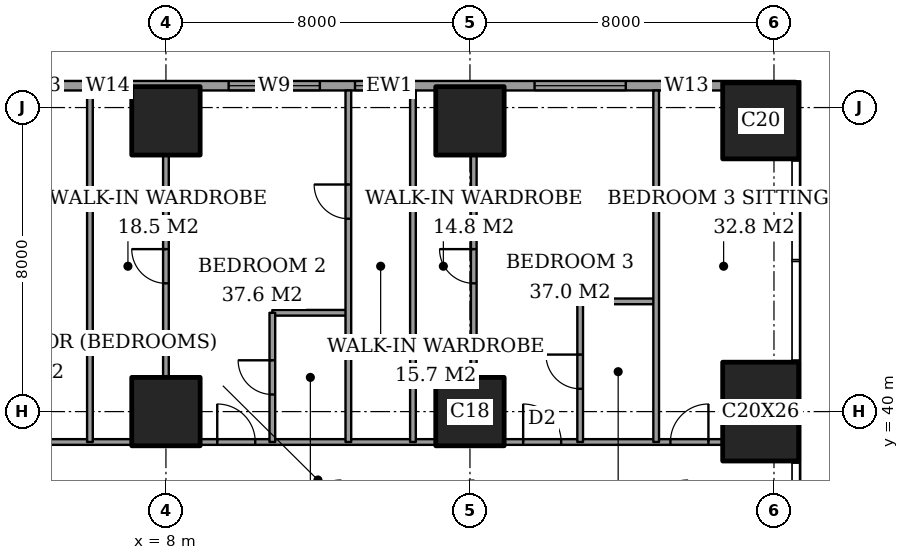
"""IFC4 building model, lengths in metres.
Left out: names, types, materials, properties, quantities, classifications, styles, units other than length and angle.
Written with IfcOpenShell. Run it as: python <this file> out.ifc"""

import sys

from ifc_helpers import new_model, si_unit, direction, frame, frame_2d, origin, origin_2d, place, context, subcontext, project, spatial, rectangle, extrude, element, fill, save


model = new_model("IFC4")
c1 = context("Model", 3, precision=1e-05, world=origin(), true_north=direction((0.0, 1.0)))
c2 = subcontext(c1, "Body", "Model", "MODEL_VIEW")
j1 = project(units=[si_unit("LENGTHUNIT", "METRE"), si_unit("PLANEANGLEUNIT", "RADIAN")], contexts=[c1])
p1 = place(None, origin())
s1 = spatial("IfcSite", under=j1, at=p1, CompositionType="ELEMENT")
p2 = place(p1, origin())
s2 = spatial("IfcBuilding", under=s1, at=p2, CompositionType="ELEMENT")
p3 = place(p2, frame((0.0, 0.0, 203.8)))
s3 = spatial("IfcBuildingStorey", under=s2, at=p3, CompositionType="ELEMENT", Elevation=203.8)
for number, where, z_axis, x_axis in (
    (1, (8.0, 40.0, 0.0), (0.0, 0.0, 1.0), (1.0, 0.0, 0.0)),
    (2, (8.0, 47.65, 0.0), (0.0, 0.0, 1.0), (1.0, 0.0, 0.0)),
    (3, (16.0, 40.0, 0.0), (0.0, 0.0, 1.0), (1.0, 0.0, 0.0)),
    (4, (16.0, 47.65, 0.0), (0.0, 0.0, 1.0), (1.0, 0.0, 0.0)),
):
    element("IfcColumn", number, at=place(p3, frame(where, z_axis=z_axis, x_axis=x_axis)), inside=s3, PredefinedType="COLUMN", context=c2, shape_type="SweptSolid", body=[
        extrude(rectangle(XDim=1.8, YDim=1.8, at=origin_2d()), origin(), (0.0, 0.0, 1.0), 3.6),
    ])
p4 = place(p3, frame((23.65, 40.0, 0.0), z_axis=(0.0, 0.0, 1.0), x_axis=(1.0, 0.0, 0.0)))
e5 = element("IfcColumn", 5, at=p4, inside=s3, PredefinedType="COLUMN", context=c2, shape_type="SweptSolid", body=[
    extrude(rectangle(XDim=2.0, YDim=2.6, at=origin_2d()), origin(), (0.0, 0.0, 1.0), 3.6),
])
p5 = place(p3, frame((23.65, 47.65, 0.0), z_axis=(0.0, 0.0, 1.0), x_axis=(1.0, 0.0, 0.0)))
e6 = element("IfcColumn", 6, at=p5, inside=s3, PredefinedType="COLUMN", context=c2, shape_type="SweptSolid", body=[
    extrude(rectangle(XDim=2.0, YDim=2.0, at=origin_2d()), origin(), (0.0, 0.0, 1.0), 3.6),
])
p6 = place(p3, frame((24.575, 48.575, 0.0), z_axis=(0.0, 0.0, 1.0), x_axis=(-1.0, 0.0, 0.0)))
e7 = element("IfcWall", 7, at=p6, inside=s3, PredefinedType="SOLIDWALL", context=c2, shape_type="SweptSolid", body=[
    extrude(rectangle(XDim=21.4, YDim=0.25, at=frame_2d((10.7, 0.0))), origin(), (0.0, 0.0, 1.0), 3.6),
])
p7 = place(p6, frame((2.275, 0.0, 0.2)))
e8 = element("IfcOpeningElement", 8, at=p7, cuts=e7, PredefinedType="OPENING", context=c2, shape_type="SweptSolid", body=[
    extrude(rectangle(XDim=1.2, YDim=2.4, at=frame_2d((0.6, 1.2))), frame((0.0, 0.135, 0.0), z_axis=(0.0, -1.0, 0.0), x_axis=(1.0, 0.0, 0.0)), (0.0, 0.0, 1.0), 0.27),
])
p8 = place(p6, frame((4.475, 0.0, 0.2)))
e9 = element("IfcOpeningElement", 9, at=p8, cuts=e7, PredefinedType="OPENING", context=c2, shape_type="SweptSolid", body=[
    extrude(rectangle(XDim=2.4, YDim=2.4, at=frame_2d((1.2, 1.2))), frame((0.0, 0.135, 0.0), z_axis=(0.0, -1.0, 0.0), x_axis=(1.0, 0.0, 0.0)), (0.0, 0.0, 1.0), 0.27),
])
p9 = place(p6, frame((10.4, 0.0, 0.2)))
e10 = element("IfcOpeningElement", 10, at=p9, cuts=e7, PredefinedType="OPENING", context=c2, shape_type="SweptSolid", body=[
    extrude(rectangle(XDim=1.2, YDim=2.4, at=frame_2d((0.6, 1.2))), frame((0.0, 0.135, 0.0), z_axis=(0.0, -1.0, 0.0), x_axis=(1.0, 0.0, 0.0)), (0.0, 0.0, 1.0), 0.27),
])
p10 = place(p6, frame((12.525, 0.0, 0.2)))
e11 = element("IfcOpeningElement", 11, at=p10, cuts=e7, PredefinedType="OPENING", context=c2, shape_type="SweptSolid", body=[
    extrude(rectangle(XDim=2.4, YDim=2.4, at=frame_2d((1.2, 1.2))), frame((0.0, 0.135, 0.0), z_axis=(0.0, -1.0, 0.0), x_axis=(1.0, 0.0, 0.0)), (0.0, 0.0, 1.0), 0.27),
])
p11 = place(p6, frame((17.8, 0.0, 0.2)))
e12 = element("IfcOpeningElement", 12, at=p11, cuts=e7, PredefinedType="OPENING", context=c2, shape_type="SweptSolid", body=[
    extrude(rectangle(XDim=0.6, YDim=2.4, at=frame_2d((0.3, 1.2))), frame((0.0, 0.135, 0.0), z_axis=(0.0, -1.0, 0.0), x_axis=(1.0, 0.0, 0.0)), (0.0, 0.0, 1.0), 0.27),
])
p12 = place(p6, frame((19.325, 0.0, 0.2)))
e13 = element("IfcOpeningElement", 13, at=p12, cuts=e7, PredefinedType="OPENING", context=c2, shape_type="SweptSolid", body=[
    extrude(rectangle(XDim=1.2, YDim=2.4, at=frame_2d((0.6, 1.2))), frame((0.0, 0.135, 0.0), z_axis=(0.0, -1.0, 0.0), x_axis=(1.0, 0.0, 0.0)), (0.0, 0.0, 1.0), 0.27),
])
p13 = place(p3, frame((1.25, 39.2, 0.0), z_axis=(0.0, 0.0, 1.0), x_axis=(1.0, 0.0, 0.0)))
e14 = element("IfcWall", 14, at=p13, inside=s3, PredefinedType="PARTITIONING", context=c2, shape_type="SweptSolid", body=[
    extrude(rectangle(XDim=5.85, YDim=0.15, at=frame_2d((2.925, 0.0))), origin(), (0.0, 0.0, 1.0), 3.35),
])
p14 = place(p13, frame((1.875, 0.0, 0.0)))
e15 = element("IfcOpeningElement", 15, at=p14, cuts=e14, PredefinedType="OPENING", context=c2, shape_type="SweptSolid", body=[
    extrude(rectangle(XDim=1.0, YDim=2.1, at=frame_2d((0.5, 1.05))), frame((0.0, 0.085, 0.0), z_axis=(0.0, -1.0, 0.0), x_axis=(1.0, 0.0, 0.0)), (0.0, 0.0, 1.0), 0.17),
])
p15 = place(p3, frame((8.9, 39.2, 0.0), z_axis=(0.0, 0.0, 1.0), x_axis=(1.0, 0.0, 0.0)))
e16 = element("IfcWall", 16, at=p15, inside=s3, PredefinedType="PARTITIONING", context=c2, shape_type="SweptSolid", body=[
    extrude(rectangle(XDim=6.2, YDim=0.15, at=frame_2d((3.1, 0.0))), origin(), (0.0, 0.0, 1.0), 3.35),
])
p16 = place(p15, frame((0.45, 0.0, 0.0)))
e17 = element("IfcOpeningElement", 17, at=p16, cuts=e16, PredefinedType="OPENING", context=c2, shape_type="SweptSolid", body=[
    extrude(rectangle(XDim=1.0, YDim=2.1, at=frame_2d((0.5, 1.05))), frame((0.0, 0.085, 0.0), z_axis=(0.0, -1.0, 0.0), x_axis=(1.0, 0.0, 0.0)), (0.0, 0.0, 1.0), 0.17),
])
p17 = place(p3, frame((16.9, 39.2, 0.0), z_axis=(0.0, 0.0, 1.0), x_axis=(1.0, 0.0, 0.0)))
e18 = element("IfcWall", 18, at=p17, inside=s3, PredefinedType="PARTITIONING", context=c2, shape_type="SweptSolid", body=[
    extrude(rectangle(XDim=5.75, YDim=0.15, at=frame_2d((2.875, 0.0))), origin(), (0.0, 0.0, 1.0), 3.35),
])
p18 = place(p17, frame((0.5, 0.0, 0.0)))
e19 = element("IfcOpeningElement", 19, at=p18, cuts=e18, PredefinedType="OPENING", context=c2, shape_type="SweptSolid", body=[
    extrude(rectangle(XDim=1.0, YDim=2.1, at=frame_2d((0.5, 1.05))), frame((0.0, 0.085, 0.0), z_axis=(0.0, -1.0, 0.0), x_axis=(1.0, 0.0, 0.0)), (0.0, 0.0, 1.0), 0.17),
])
p19 = place(p17, frame((4.375, 0.0, 0.0)))
e20 = element("IfcOpeningElement", 20, at=p19, cuts=e18, PredefinedType="OPENING", context=c2, shape_type="SweptSolid", body=[
    extrude(rectangle(XDim=1.0, YDim=2.1, at=frame_2d((0.5, 1.05))), frame((0.0, 0.085, 0.0), z_axis=(0.0, -1.0, 0.0), x_axis=(1.0, 0.0, 0.0)), (0.0, 0.0, 1.0), 0.17),
])
for number, where, z_axis, x_axis in (
    (21, (10.8, 42.6, 0.0), (0.0, 0.0, 1.0), (1.0, 0.0, 0.0)),
    (22, (18.9, 42.9, 0.0), (0.0, 0.0, 1.0), (1.0, 0.0, 0.0)),
):
    element("IfcWall", number, at=place(p3, frame(where, z_axis=z_axis, x_axis=x_axis)), inside=s3, PredefinedType="PARTITIONING", context=c2, shape_type="SweptSolid", body=[
        extrude(rectangle(XDim=2.0, YDim=0.15, at=frame_2d((1.0, 0.0))), origin(), (0.0, 0.0, 1.0), 3.35),
    ])
p20 = place(p3, frame((6.0, 39.2, 0.0), z_axis=(0.0, 0.0, 1.0), x_axis=(0.0, 1.0, 0.0)))
e23 = element("IfcWall", 23, at=p20, inside=s3, PredefinedType="PARTITIONING", context=c2, shape_type="SweptSolid", body=[
    extrude(rectangle(XDim=9.25, YDim=0.15, at=frame_2d((4.625, 0.0))), origin(), (0.0, 0.0, 1.0), 3.35),
])
p21 = place(p3, frame((8.0, 40.9, 0.0), z_axis=(0.0, 0.0, 1.0), x_axis=(0.0, 1.0, 0.0)))
e24 = element("IfcWall", 24, at=p21, inside=s3, PredefinedType="PARTITIONING", context=c2, shape_type="SweptSolid", body=[
    extrude(rectangle(XDim=5.85, YDim=0.15, at=frame_2d((2.925, 0.0))), origin(), (0.0, 0.0, 1.0), 3.35),
])
p22 = place(p21, frame((2.475, 0.0, 0.0)))
e25 = element("IfcOpeningElement", 25, at=p22, cuts=e24, PredefinedType="OPENING", context=c2, shape_type="SweptSolid", body=[
    extrude(rectangle(XDim=0.9, YDim=2.1, at=frame_2d((0.45, 1.05))), frame((0.0, 0.085, 0.0), z_axis=(0.0, -1.0, 0.0), x_axis=(1.0, 0.0, 0.0)), (0.0, 0.0, 1.0), 0.17),
])
p23 = place(p3, frame((10.8, 39.2, 0.0), z_axis=(0.0, 0.0, 1.0), x_axis=(0.0, 1.0, 0.0)))
e26 = element("IfcWall", 26, at=p23, inside=s3, PredefinedType="PARTITIONING", context=c2, shape_type="SweptSolid", body=[
    extrude(rectangle(XDim=3.4, YDim=0.15, at=frame_2d((1.7, 0.0))), origin(), (0.0, 0.0, 1.0), 3.35),
])
p24 = place(p23, frame((1.25, 0.0, 0.0)))
e27 = element("IfcOpeningElement", 27, at=p24, cuts=e26, PredefinedType="OPENING", context=c2, shape_type="SweptSolid", body=[
    extrude(rectangle(XDim=0.9, YDim=2.1, at=frame_2d((0.45, 1.05))), frame((0.0, 0.085, 0.0), z_axis=(0.0, -1.0, 0.0), x_axis=(1.0, 0.0, 0.0)), (0.0, 0.0, 1.0), 0.17),
])
p25 = place(p3, frame((12.8, 39.2, 0.0), z_axis=(0.0, 0.0, 1.0), x_axis=(0.0, 1.0, 0.0)))
e28 = element("IfcWall", 28, at=p25, inside=s3, PredefinedType="PARTITIONING", context=c2, shape_type="SweptSolid", body=[
    extrude(rectangle(XDim=9.25, YDim=0.15, at=frame_2d((4.625, 0.0))), origin(), (0.0, 0.0, 1.0), 3.35),
])
p26 = place(p25, frame((5.875, 0.0, 0.0)))
e29 = element("IfcOpeningElement", 29, at=p26, cuts=e28, PredefinedType="OPENING", context=c2, shape_type="SweptSolid", body=[
    extrude(rectangle(XDim=0.9, YDim=2.1, at=frame_2d((0.45, 1.05))), frame((0.0, 0.085, 0.0), z_axis=(0.0, -1.0, 0.0), x_axis=(1.0, 0.0, 0.0)), (0.0, 0.0, 1.0), 0.17),
])
p27 = place(p3, frame((14.5, 39.2, 0.0), z_axis=(0.0, 0.0, 1.0), x_axis=(0.0, 1.0, 0.0)))
e30 = element("IfcWall", 30, at=p27, inside=s3, PredefinedType="PARTITIONING", context=c2, shape_type="SweptSolid", body=[
    extrude(rectangle(XDim=9.25, YDim=0.15, at=frame_2d((4.625, 0.0))), origin(), (0.0, 0.0, 1.0), 3.35),
])
p28 = place(p3, frame((16.1, 40.9, 0.0), z_axis=(0.0, 0.0, 1.0), x_axis=(0.0, 1.0, 0.0)))
e31 = element("IfcWall", 31, at=p28, inside=s3, PredefinedType="PARTITIONING", context=c2, shape_type="SweptSolid", body=[
    extrude(rectangle(XDim=5.85, YDim=0.15, at=frame_2d((2.925, 0.0))), origin(), (0.0, 0.0, 1.0), 3.35),
])
p29 = place(p28, frame((2.475, 0.0, 0.0)))
e32 = element("IfcOpeningElement", 32, at=p29, cuts=e31, PredefinedType="OPENING", context=c2, shape_type="SweptSolid", body=[
    extrude(rectangle(XDim=0.9, YDim=2.1, at=frame_2d((0.45, 1.05))), frame((0.0, 0.085, 0.0), z_axis=(0.0, -1.0, 0.0), x_axis=(1.0, 0.0, 0.0)), (0.0, 0.0, 1.0), 0.17),
])
p30 = place(p3, frame((18.9, 39.2, 0.0), z_axis=(0.0, 0.0, 1.0), x_axis=(0.0, 1.0, 0.0)))
e33 = element("IfcWall", 33, at=p30, inside=s3, PredefinedType="PARTITIONING", context=c2, shape_type="SweptSolid", body=[
    extrude(rectangle(XDim=3.7, YDim=0.15, at=frame_2d((1.85, 0.0))), origin(), (0.0, 0.0, 1.0), 3.35),
])
p31 = place(p30, frame((1.4, 0.0, 0.0)))
e34 = element("IfcOpeningElement", 34, at=p31, cuts=e33, PredefinedType="OPENING", context=c2, shape_type="SweptSolid", body=[
    extrude(rectangle(XDim=0.9, YDim=2.1, at=frame_2d((0.45, 1.05))), frame((0.0, 0.085, 0.0), z_axis=(0.0, -1.0, 0.0), x_axis=(1.0, 0.0, 0.0)), (0.0, 0.0, 1.0), 0.17),
])
p32 = place(p3, frame((20.9, 39.2, 0.0), z_axis=(0.0, 0.0, 1.0), x_axis=(0.0, 1.0, 0.0)))
e35 = element("IfcWall", 35, at=p32, inside=s3, PredefinedType="PARTITIONING", context=c2, shape_type="SweptSolid", body=[
    extrude(rectangle(XDim=9.25, YDim=0.15, at=frame_2d((4.625, 0.0))), origin(), (0.0, 0.0, 1.0), 3.35),
])
p33 = place(p7, origin())
e36 = element("IfcWindow", 36, at=p33, inside=s3, PartitioningType="SINGLE_PANEL", PredefinedType="WINDOW", context=c2, shape_type="SweptSolid", body=[
    extrude(rectangle(XDim=1.2, YDim=2.4, at=frame_2d((0.6, 1.2))), frame((0.0, 0.03, 0.0), z_axis=(0.0, -1.0, 0.0), x_axis=(1.0, 0.0, 0.0)), (0.0, 0.0, 1.0), 0.06),
])
fill(e8, e36)
p34 = place(p8, origin())
e37 = element("IfcWindow", 37, at=p34, inside=s3, PartitioningType="SINGLE_PANEL", PredefinedType="WINDOW", context=c2, shape_type="SweptSolid", body=[
    extrude(rectangle(XDim=2.4, YDim=2.4, at=frame_2d((1.2, 1.2))), frame((0.0, 0.03, 0.0), z_axis=(0.0, -1.0, 0.0), x_axis=(1.0, 0.0, 0.0)), (0.0, 0.0, 1.0), 0.06),
])
fill(e9, e37)
p35 = place(p9, origin())
e38 = element("IfcWindow", 38, at=p35, inside=s3, PartitioningType="SINGLE_PANEL", PredefinedType="WINDOW", context=c2, shape_type="SweptSolid", body=[
    extrude(rectangle(XDim=1.2, YDim=2.4, at=frame_2d((0.6, 1.2))), frame((0.0, 0.03, 0.0), z_axis=(0.0, -1.0, 0.0), x_axis=(1.0, 0.0, 0.0)), (0.0, 0.0, 1.0), 0.06),
])
fill(e10, e38)
p36 = place(p10, origin())
e39 = element("IfcWindow", 39, at=p36, inside=s3, PartitioningType="SINGLE_PANEL", PredefinedType="WINDOW", context=c2, shape_type="SweptSolid", body=[
    extrude(rectangle(XDim=2.4, YDim=2.4, at=frame_2d((1.2, 1.2))), frame((0.0, 0.03, 0.0), z_axis=(0.0, -1.0, 0.0), x_axis=(1.0, 0.0, 0.0)), (0.0, 0.0, 1.0), 0.06),
])
fill(e11, e39)
p37 = place(p11, origin())
e40 = element("IfcWindow", 40, at=p37, inside=s3, PartitioningType="SINGLE_PANEL", PredefinedType="WINDOW", context=c2, shape_type="SweptSolid", body=[
    extrude(rectangle(XDim=0.6, YDim=2.4, at=frame_2d((0.3, 1.2))), frame((0.0, 0.03, 0.0), z_axis=(0.0, -1.0, 0.0), x_axis=(1.0, 0.0, 0.0)), (0.0, 0.0, 1.0), 0.06),
])
fill(e12, e40)
p38 = place(p12, origin())
e41 = element("IfcWindow", 41, at=p38, inside=s3, PartitioningType="SINGLE_PANEL", PredefinedType="WINDOW", context=c2, shape_type="SweptSolid", body=[
    extrude(rectangle(XDim=1.2, YDim=2.4, at=frame_2d((0.6, 1.2))), frame((0.0, 0.03, 0.0), z_axis=(0.0, -1.0, 0.0), x_axis=(1.0, 0.0, 0.0)), (0.0, 0.0, 1.0), 0.06),
])
fill(e13, e41)
p39 = place(p22, origin())
e42 = element("IfcDoor", 42, at=p39, inside=s3, OperationType="SINGLE_SWING_LEFT", PredefinedType="DOOR", context=c2, shape_type="SweptSolid", body=[
    extrude(rectangle(XDim=0.9, YDim=2.1, at=frame_2d((0.45, 1.05))), frame((0.0, 0.025, 0.0), z_axis=(0.0, -1.0, 0.0), x_axis=(1.0, 0.0, 0.0)), (0.0, 0.0, 1.0), 0.05),
])
fill(e25, e42)
p40 = place(p24, origin())
e43 = element("IfcDoor", 43, at=p40, inside=s3, OperationType="SINGLE_SWING_LEFT", PredefinedType="DOOR", context=c2, shape_type="SweptSolid", body=[
    extrude(rectangle(XDim=0.9, YDim=2.1, at=frame_2d((0.45, 1.05))), frame((0.0, 0.025, 0.0), z_axis=(0.0, -1.0, 0.0), x_axis=(1.0, 0.0, 0.0)), (0.0, 0.0, 1.0), 0.05),
])
fill(e27, e43)
p41 = place(p16, origin())
e44 = element("IfcDoor", 44, at=p41, inside=s3, OperationType="SINGLE_SWING_RIGHT", PredefinedType="DOOR", context=c2, shape_type="SweptSolid", body=[
    extrude(rectangle(XDim=1.0, YDim=2.1, at=frame_2d((0.5, 1.05))), frame((0.0, 0.025, 0.0), z_axis=(0.0, -1.0, 0.0), x_axis=(1.0, 0.0, 0.0)), (0.0, 0.0, 1.0), 0.05),
])
fill(e17, e44)
p42 = place(p26, origin())
e45 = element("IfcDoor", 45, at=p42, inside=s3, OperationType="SINGLE_SWING_LEFT", PredefinedType="DOOR", context=c2, shape_type="SweptSolid", body=[
    extrude(rectangle(XDim=0.9, YDim=2.1, at=frame_2d((0.45, 1.05))), frame((0.0, 0.025, 0.0), z_axis=(0.0, -1.0, 0.0), x_axis=(1.0, 0.0, 0.0)), (0.0, 0.0, 1.0), 0.05),
])
fill(e29, e45)
p43 = place(p29, origin())
e46 = element("IfcDoor", 46, at=p43, inside=s3, OperationType="SINGLE_SWING_LEFT", PredefinedType="DOOR", context=c2, shape_type="SweptSolid", body=[
    extrude(rectangle(XDim=0.9, YDim=2.1, at=frame_2d((0.45, 1.05))), frame((0.0, 0.025, 0.0), z_axis=(0.0, -1.0, 0.0), x_axis=(1.0, 0.0, 0.0)), (0.0, 0.0, 1.0), 0.05),
])
fill(e32, e46)
p44 = place(p31, origin())
e47 = element("IfcDoor", 47, at=p44, inside=s3, OperationType="SINGLE_SWING_LEFT", PredefinedType="DOOR", context=c2, shape_type="SweptSolid", body=[
    extrude(rectangle(XDim=0.9, YDim=2.1, at=frame_2d((0.45, 1.05))), frame((0.0, 0.025, 0.0), z_axis=(0.0, -1.0, 0.0), x_axis=(1.0, 0.0, 0.0)), (0.0, 0.0, 1.0), 0.05),
])
fill(e34, e47)
p45 = place(p18, origin())
e48 = element("IfcDoor", 48, at=p45, inside=s3, OperationType="SINGLE_SWING_RIGHT", PredefinedType="DOOR", context=c2, shape_type="SweptSolid", body=[
    extrude(rectangle(XDim=1.0, YDim=2.1, at=frame_2d((0.5, 1.05))), frame((0.0, 0.025, 0.0), z_axis=(0.0, -1.0, 0.0), x_axis=(1.0, 0.0, 0.0)), (0.0, 0.0, 1.0), 0.05),
])
fill(e19, e48)
p46 = place(p19, origin())
e49 = element("IfcDoor", 49, at=p46, inside=s3, OperationType="SINGLE_SWING_LEFT", PredefinedType="DOOR", context=c2, shape_type="SweptSolid", body=[
    extrude(rectangle(XDim=1.0, YDim=2.1, at=frame_2d((0.5, 1.05))), frame((0.0, 0.025, 0.0), z_axis=(0.0, -1.0, 0.0), x_axis=(1.0, 0.0, 0.0)), (0.0, 0.0, 1.0), 0.05),
])
fill(e20, e49)
save(model, sys.argv[1])
